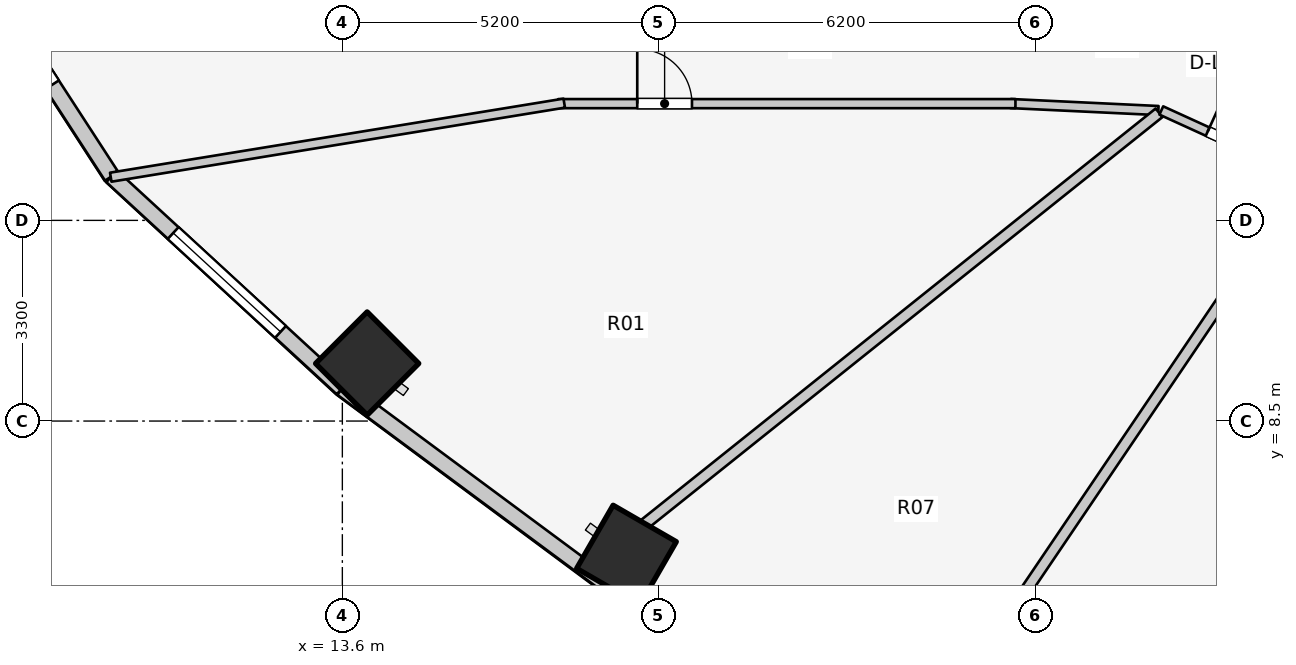
"""IFC4 building model, lengths in metres.
Left out: names, types, materials, properties, quantities, classifications, styles, units other than length and angle.
Written with IfcOpenShell. Run it as: python <this file> out.ifc"""

import sys

from ifc_helpers import new_model, si_unit, direction, frame, frame_2d, origin, origin_2d, place, context, subcontext, project, spatial, rectangle, extrude, element, fill, save


model = new_model("IFC4")
c1 = context("Model", 3, precision=1e-05, world=origin(), true_north=direction((0.0, 1.0)))
c2 = subcontext(c1, "Body", "Model", "MODEL_VIEW")
j1 = project(units=[si_unit("LENGTHUNIT", "METRE"), si_unit("PLANEANGLEUNIT", "RADIAN")], contexts=[c1])
p1 = place(None, origin())
s1 = spatial("IfcSite", under=j1, at=p1, CompositionType="ELEMENT")
p2 = place(p1, origin())
s2 = spatial("IfcBuilding", under=s1, at=p2, CompositionType="ELEMENT")
p3 = place(p2, frame((0.0, 0.0, 55.5)))
s3 = spatial("IfcBuildingStorey", under=s2, at=p3, CompositionType="ELEMENT", Elevation=55.5)
for number, where, z_axis, x_axis in (
    (1, (14.008, 9.446, 0.0), (0.0, 0.0, 1.0), (-0.707, -0.707, 0.0)),
    (2, (18.273, 6.296, 0.0), (0.0, 0.0, 1.0), (-0.5, -0.866, 0.0)),
):
    element("IfcColumn", number, at=place(p3, frame(where, z_axis=z_axis, x_axis=x_axis)), inside=s3, PredefinedType="COLUMN", context=c2, shape_type="SweptSolid", body=[
        extrude(rectangle(XDim=1.2, YDim=1.2, at=origin_2d()), origin(), (0.0, 0.0, 1.0), 3.1),
    ])
p4 = place(p3, frame((7.033, 16.795, 0.0), z_axis=(0.0, 0.0, 1.0), x_axis=(0.544578722263, -0.838709732421, 0.0)))
e3 = element("IfcWall", 3, at=p4, inside=s3, PredefinedType="STANDARD", context=c2, shape_type="SweptSolid", body=[
    extrude(rectangle(XDim=5.092, YDim=0.26, at=frame_2d((2.546, 0.0))), origin(), (0.0, 0.0, 1.0), 2.85),
])
p5 = place(p4, frame((1.796, 0.0, 0.75)))
e4 = element("IfcOpeningElement", 4, at=p5, cuts=e3, PredefinedType="OPENING", context=c2, shape_type="SweptSolid", body=[
    extrude(rectangle(XDim=1.5, YDim=1.6, at=frame_2d((0.75, 0.8))), frame((0.0, 0.14, 0.0), z_axis=(0.0, -1.0, 0.0), x_axis=(1.0, 0.0, 0.0)), (0.0, 0.0, 1.0), 0.28),
])
p6 = place(p3, frame((9.806, 12.524, 0.0), z_axis=(0.0, 0.0, 1.0), x_axis=(0.735655109293, -0.67735630223, 0.0)))
e5 = element("IfcWall", 5, at=p6, inside=s3, PredefinedType="STANDARD", context=c2, shape_type="SweptSolid", body=[
    extrude(rectangle(XDim=5.151, YDim=0.26, at=frame_2d((2.575, 0.0))), origin(), (0.0, 0.0, 1.0), 2.85),
])
p7 = place(p6, frame((1.375, 0.0, 0.75)))
e6 = element("IfcOpeningElement", 6, at=p7, cuts=e5, PredefinedType="OPENING", context=c2, shape_type="SweptSolid", body=[
    extrude(rectangle(XDim=2.4, YDim=1.7, at=frame_2d((1.2, 0.85))), frame((0.0, 0.14, 0.0), z_axis=(0.0, -1.0, 0.0), x_axis=(1.0, 0.0, 0.0)), (0.0, 0.0, 1.0), 0.28),
])
p8 = place(p3, frame((13.595, 9.035, 0.0), z_axis=(0.0, 0.0, 1.0), x_axis=(0.803477531792, -0.595335078679, 0.0)))
e7 = element("IfcWall", 7, at=p8, inside=s3, PredefinedType="STANDARD", context=c2, shape_type="SweptSolid", body=[
    extrude(rectangle(XDim=5.43, YDim=0.26, at=frame_2d((2.715, 0.0))), origin(), (0.0, 0.0, 1.0), 2.85),
])
p9 = place(p3, frame((17.958, 5.803, 0.0), z_axis=(0.0, 0.0, 1.0), x_axis=(0.919612132394, -0.39282760335, 0.0)))
e8 = element("IfcWall", 8, at=p9, inside=s3, PredefinedType="STANDARD", context=c2, shape_type="SweptSolid", body=[
    extrude(rectangle(XDim=6.209, YDim=0.26, at=frame_2d((3.105, 0.0))), origin(), (0.0, 0.0, 1.0), 2.85),
])
p10 = place(p9, frame((2.355, 0.0, 0.75)))
e9 = element("IfcOpeningElement", 9, at=p10, cuts=e8, PredefinedType="OPENING", context=c2, shape_type="SweptSolid", body=[
    extrude(rectangle(XDim=1.5, YDim=1.6, at=frame_2d((0.75, 0.8))), frame((0.0, 0.14, 0.0), z_axis=(0.0, -1.0, 0.0), x_axis=(1.0, 0.0, 0.0)), (0.0, 0.0, 1.0), 0.28),
])
p11 = place(p3, frame((27.89, 15.015, 0.0), z_axis=(0.0, 0.0, 1.0), x_axis=(0.906943449489, -0.421252393975, 0.0)))
e10 = element("IfcWall", 10, at=p11, inside=s3, PredefinedType="PARTITIONING", context=c2, shape_type="SweptSolid", body=[
    extrude(rectangle(XDim=2.186, YDim=0.15, at=frame_2d((1.093, 0.0))), origin(), (0.0, 0.0, 1.0), 2.237),
])
p12 = place(p3, frame((27.02, 13.606, 0.0), z_axis=(0.0, 0.0, 1.0), x_axis=(-0.998877427952, 0.047369651964, 0.0)))
e11 = element("IfcWall", 11, at=p12, inside=s3, PredefinedType="PARTITIONING", context=c2, shape_type="SweptSolid", body=[
    extrude(rectangle(XDim=2.433, YDim=0.15, at=frame_2d((1.216, 0.0))), origin(), (0.0, 0.0, 1.0), 2.237),
])
p13 = place(p3, frame((17.15, 13.72, 0.0), z_axis=(0.0, 0.0, 1.0), x_axis=(1.0, 0.0, 0.0)))
e12 = element("IfcWall", 12, at=p13, inside=s3, PredefinedType="PARTITIONING", context=c2, shape_type="SweptSolid", body=[
    extrude(rectangle(XDim=7.52, YDim=0.15, at=frame_2d((3.76, 0.0))), origin(), (0.0, 0.0, 1.0), 2.237),
])
p14 = place(p13, frame((1.3, 0.0, 0.0)))
e13 = element("IfcOpeningElement", 13, at=p14, cuts=e12, PredefinedType="OPENING", context=c2, shape_type="SweptSolid", body=[
    extrude(rectangle(XDim=0.9, YDim=2.1, at=frame_2d((0.45, 1.05))), frame((0.0, 0.085, 0.0), z_axis=(0.0, -1.0, 0.0), x_axis=(1.0, 0.0, 0.0)), (0.0, 0.0, 1.0), 0.17),
])
p15 = place(p3, frame((17.249, 13.728, 0.0), z_axis=(0.0, 0.0, 1.0), x_axis=(-0.98693078372, -0.161144742846, 0.0)))
e14 = element("IfcWall", 14, at=p15, inside=s3, PredefinedType="PARTITIONING", context=c2, shape_type="SweptSolid", body=[
    extrude(rectangle(XDim=7.557, YDim=0.15, at=frame_2d((3.779, 0.0))), origin(), (0.0, 0.0, 1.0), 2.069),
])
p16 = place(p3, frame((27.032, 13.569, 0.0), z_axis=(0.0, 0.0, 1.0), x_axis=(-0.781055486744, -0.624461629428, 0.0)))
e15 = element("IfcWall", 15, at=p16, inside=s3, PredefinedType="PARTITIONING", context=c2, shape_type="SweptSolid", body=[
    extrude(rectangle(XDim=10.843, YDim=0.18, at=frame_2d((5.422, 0.0))), origin(), (0.0, 0.0, 1.0), 2.237),
])
p17 = place(p3, frame((29.42, 12.474, 0.0), z_axis=(0.0, 0.0, 1.0), x_axis=(-0.560641882674, -0.828058379217, 0.0)))
e16 = element("IfcWall", 16, at=p17, inside=s3, PredefinedType="PARTITIONING", context=c2, shape_type="SweptSolid", body=[
    extrude(rectangle(XDim=9.658, YDim=0.18, at=frame_2d((4.829, 0.0))), origin(), (0.0, 0.0, 1.0), 2.237),
])
p18 = place(p3, frame((27.069, 13.607, 0.0), z_axis=(0.0, 0.0, 1.0), x_axis=(0.909747571199, -0.415161843982, 0.0)))
e17 = element("IfcWall", 17, at=p18, inside=s3, PredefinedType="PARTITIONING", context=c2, shape_type="SweptSolid", body=[
    extrude(rectangle(XDim=2.625, YDim=0.15, at=frame_2d((1.312, 0.0))), origin(), (0.0, 0.0, 1.0), 2.237),
])
p19 = place(p18, frame((0.838, 0.0, 0.0)))
e18 = element("IfcOpeningElement", 18, at=p19, cuts=e17, PredefinedType="OPENING", context=c2, shape_type="SweptSolid", body=[
    extrude(rectangle(XDim=0.95, YDim=2.1, at=frame_2d((0.475, 1.05))), frame((0.0, 0.085, 0.0), z_axis=(0.0, -1.0, 0.0), x_axis=(1.0, 0.0, 0.0)), (0.0, 0.0, 1.0), 0.17),
])
p20 = place(p5, origin())
e19 = element("IfcWindow", 19, at=p20, inside=s3, PartitioningType="SINGLE_PANEL", PredefinedType="WINDOW", context=c2, shape_type="SweptSolid", body=[
    extrude(rectangle(XDim=1.5, YDim=1.6, at=frame_2d((0.75, 0.8))), frame((0.0, 0.03, 0.0), z_axis=(0.0, -1.0, 0.0), x_axis=(1.0, 0.0, 0.0)), (0.0, 0.0, 1.0), 0.06),
])
fill(e4, e19)
p21 = place(p7, origin())
e20 = element("IfcWindow", 20, at=p21, inside=s3, PartitioningType="SINGLE_PANEL", PredefinedType="WINDOW", context=c2, shape_type="SweptSolid", body=[
    extrude(rectangle(XDim=2.4, YDim=1.7, at=frame_2d((1.2, 0.85))), frame((0.0, 0.03, 0.0), z_axis=(0.0, -1.0, 0.0), x_axis=(1.0, 0.0, 0.0)), (0.0, 0.0, 1.0), 0.06),
])
fill(e6, e20)
p22 = place(p14, origin())
e21 = element("IfcDoor", 21, at=p22, inside=s3, OperationType="SINGLE_SWING_LEFT", PredefinedType="DOOR", context=c2, shape_type="SweptSolid", body=[
    extrude(rectangle(XDim=0.9, YDim=2.1, at=frame_2d((0.45, 1.05))), frame((0.0, 0.025, 0.0), z_axis=(0.0, -1.0, 0.0), x_axis=(1.0, 0.0, 0.0)), (0.0, 0.0, 1.0), 0.05),
])
fill(e13, e21)
p23 = place(p19, origin())
e22 = element("IfcDoor", 22, at=p23, inside=s3, OperationType="SINGLE_SWING_LEFT", PredefinedType="DOOR", context=c2, shape_type="SweptSolid", body=[
    extrude(rectangle(XDim=0.95, YDim=2.1, at=frame_2d((0.475, 1.05))), frame((0.0, 0.025, 0.0), z_axis=(0.0, -1.0, 0.0), x_axis=(1.0, 0.0, 0.0)), (0.0, 0.0, 1.0), 0.05),
])
fill(e18, e22)
save(model, sys.argv[1])
